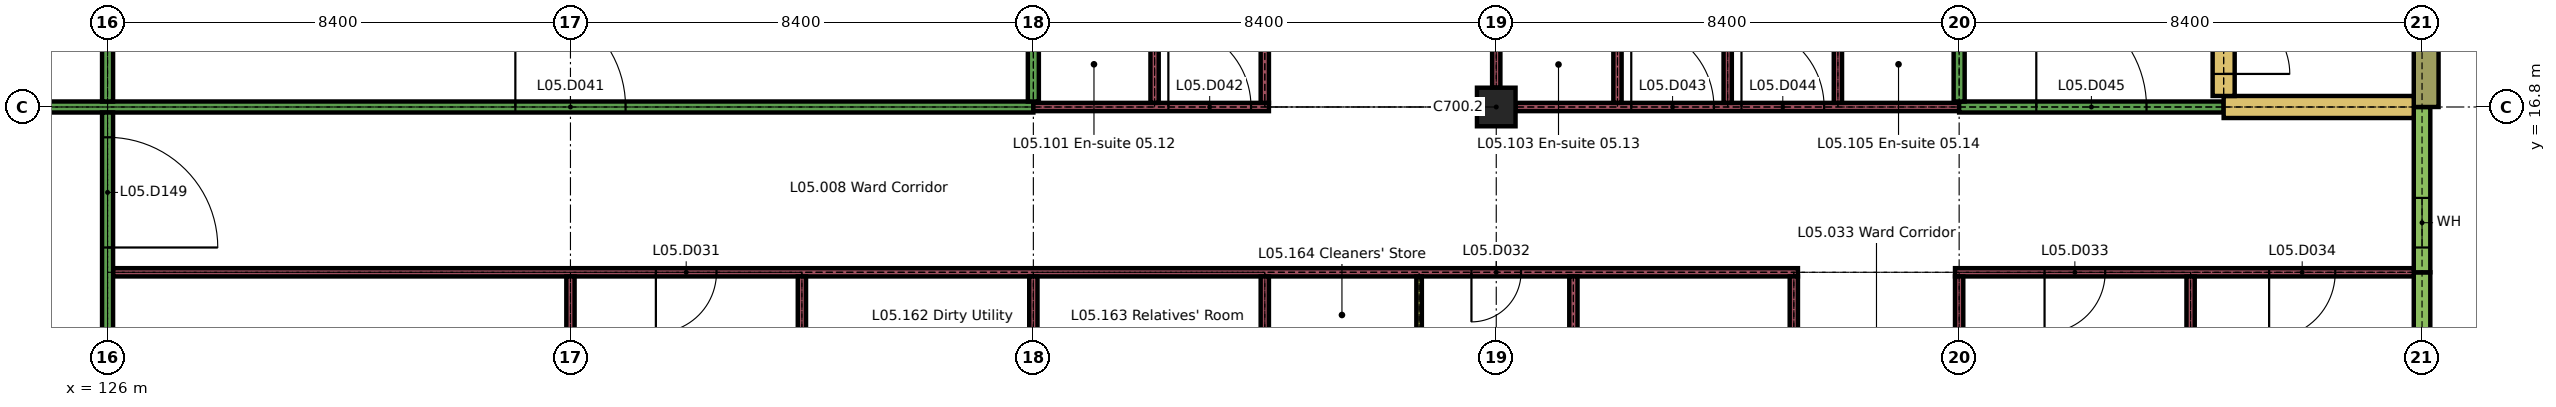
"""IFC4 building model, lengths in metres.
Left out: names, types, materials, properties, quantities, classifications, styles, units other than length and angle.
Written with IfcOpenShell. Run it as: python <this file> out.ifc"""

import sys

from ifc_helpers import new_model, si_unit, direction, frame, frame_2d, origin, origin_2d, place, context, subcontext, project, spatial, rectangle, extrude, element, fill, save


model = new_model("IFC4")
c1 = context("Model", 3, precision=1e-05, world=origin(), true_north=direction((0.0, 1.0)))
c2 = subcontext(c1, "Body", "Model", "MODEL_VIEW")
j1 = project(units=[si_unit("LENGTHUNIT", "METRE"), si_unit("PLANEANGLEUNIT", "RADIAN")], contexts=[c1])
p1 = place(None, origin())
s1 = spatial("IfcSite", under=j1, at=p1, CompositionType="ELEMENT")
p2 = place(p1, origin())
s2 = spatial("IfcBuilding", under=s1, at=p2, CompositionType="ELEMENT")
p3 = place(p2, frame((0.0, 0.0, 22.5)))
s3 = spatial("IfcBuildingStorey", under=s2, at=p3, CompositionType="ELEMENT", Elevation=22.5)
p4 = place(p3, frame((151.2, 16.8, 0.0), z_axis=(0.0, 0.0, 1.0), x_axis=(1.0, 0.0, 0.0)))
e1 = element("IfcColumn", 1, at=p4, inside=s3, PredefinedType="COLUMN", context=c2, shape_type="SweptSolid", body=[
    extrude(rectangle(XDim=0.7, YDim=0.7, at=origin_2d()), origin(), (0.0, 0.0, 1.0), 3.26),
])
p5 = place(p3, frame((168.0, 11.4, 0.0), z_axis=(0.0, 0.0, 1.0), x_axis=(0.0, 1.0, 0.0)))
e2 = element("IfcWall", 2, at=p5, inside=s3, PredefinedType="SOLIDWALL", context=c2, shape_type="SweptSolid", body=[
    extrude(rectangle(XDim=2.4, YDim=0.3, at=frame_2d((1.2, 0.0))), origin(), (0.0, 0.0, 1.0), 2.96),
])
p6 = place(p3, frame((168.0, 13.8, 0.0), z_axis=(0.0, 0.0, 1.0), x_axis=(0.0, 1.0, 0.0)))
e3 = element("IfcWall", 3, at=p6, inside=s3, PredefinedType="SOLIDWALL", context=c2, shape_type="SweptSolid", body=[
    extrude(rectangle(XDim=3.0, YDim=0.3, at=frame_2d((1.5, 0.0))), origin(), (0.0, 0.0, 1.0), 2.96),
])
p7 = place(p6, frame((0.45, 0.0, 0.9)))
e4 = element("IfcOpeningElement", 4, at=p7, cuts=e3, PredefinedType="OPENING", context=c2, shape_type="SweptSolid", body=[
    extrude(rectangle(XDim=0.9, YDim=1.5, at=frame_2d((0.45, 0.75))), frame((0.0, 0.16, 0.0), z_axis=(0.0, -1.0, 0.0), x_axis=(1.0, 0.0, 0.0)), (0.0, 0.0, 1.0), 0.32),
])
p8 = place(p3, frame((168.075, 16.8, 0.0), z_axis=(0.0, 0.0, 1.0), x_axis=(0.0, 1.0, 0.0)))
e5 = element("IfcWall", 5, at=p8, inside=s3, PredefinedType="SOLIDWALL", context=c2, shape_type="SweptSolid", body=[
    extrude(rectangle(XDim=3.15, YDim=0.45, at=frame_2d((1.575, 0.0))), origin(), (0.0, 0.0, 1.0), 3.26),
])
p9 = place(p3, frame((126.1, 13.8, 0.0), z_axis=(0.0, 0.0, 1.0), x_axis=(1.0, 0.0, 0.0)))
e6 = element("IfcWall", 6, at=p9, inside=s3, PredefinedType="PARTITIONING", context=c2, shape_type="SweptSolid", body=[
    extrude(rectangle(XDim=30.575, YDim=0.15, at=frame_2d((15.288, 0.0))), origin(), (0.0, 0.0, 1.0), 3.26),
])
p10 = place(p9, frame((9.85, 0.0, 0.0)))
e7 = element("IfcOpeningElement", 7, at=p10, cuts=e6, PredefinedType="OPENING", context=c2, shape_type="SweptSolid", body=[
    extrude(rectangle(XDim=1.1, YDim=2.1, at=frame_2d((0.55, 1.05))), frame((0.0, 0.085, 0.0), z_axis=(0.0, -1.0, 0.0), x_axis=(1.0, 0.0, 0.0)), (0.0, 0.0, 1.0), 0.17),
])
p11 = place(p9, frame((24.65, 0.0, 0.0)))
e8 = element("IfcOpeningElement", 8, at=p11, cuts=e6, PredefinedType="OPENING", context=c2, shape_type="SweptSolid", body=[
    extrude(rectangle(XDim=0.9, YDim=2.1, at=frame_2d((0.45, 1.05))), frame((0.0, 0.085, 0.0), z_axis=(0.0, -1.0, 0.0), x_axis=(1.0, 0.0, 0.0)), (0.0, 0.0, 1.0), 0.17),
])
p12 = place(p3, frame((159.525, 13.8, 0.0), z_axis=(0.0, 0.0, 1.0), x_axis=(1.0, 0.0, 0.0)))
e9 = element("IfcWall", 9, at=p12, inside=s3, PredefinedType="PARTITIONING", context=c2, shape_type="SweptSolid", body=[
    extrude(rectangle(XDim=8.325, YDim=0.15, at=frame_2d((4.163, 0.0))), origin(), (0.0, 0.0, 1.0), 3.26),
])
p13 = place(p12, frame((1.625, 0.0, 0.0)))
e10 = element("IfcOpeningElement", 10, at=p13, cuts=e9, PredefinedType="OPENING", context=c2, shape_type="SweptSolid", body=[
    extrude(rectangle(XDim=1.1, YDim=2.1, at=frame_2d((0.55, 1.05))), frame((0.0, 0.085, 0.0), z_axis=(0.0, -1.0, 0.0), x_axis=(1.0, 0.0, 0.0)), (0.0, 0.0, 1.0), 0.17),
])
p14 = place(p12, frame((5.7, 0.0, 0.0)))
e11 = element("IfcOpeningElement", 11, at=p14, cuts=e9, PredefinedType="OPENING", context=c2, shape_type="SweptSolid", body=[
    extrude(rectangle(XDim=1.2, YDim=2.1, at=frame_2d((0.6, 1.05))), frame((0.0, 0.085, 0.0), z_axis=(0.0, -1.0, 0.0), x_axis=(1.0, 0.0, 0.0)), (0.0, 0.0, 1.0), 0.17),
])
p15 = place(p3, frame((117.7, 16.8, 0.0), z_axis=(0.0, 0.0, 1.0), x_axis=(1.0, 0.0, 0.0)))
e12 = element("IfcWall", 12, at=p15, inside=s3, PredefinedType="PARTITIONING", context=c2, shape_type="SweptSolid", body=[
    extrude(rectangle(XDim=25.1, YDim=0.2, at=frame_2d((12.55, 0.0))), origin(), (0.0, 0.0, 1.0), 3.26),
])
p16 = place(p15, frame((3.3, 0.0, 0.0)))
e13 = element("IfcOpeningElement", 13, at=p16, cuts=e12, PredefinedType="OPENING", context=c2, shape_type="SweptSolid", body=[
    extrude(rectangle(XDim=1.7, YDim=2.4, at=frame_2d((0.85, 1.2))), frame((0.0, 0.11, 0.0), z_axis=(0.0, -1.0, 0.0), x_axis=(1.0, 0.0, 0.0)), (0.0, 0.0, 1.0), 0.22),
])
p17 = place(p15, frame((15.7, 0.0, 0.0)))
e14 = element("IfcOpeningElement", 14, at=p17, cuts=e12, PredefinedType="OPENING", context=c2, shape_type="SweptSolid", body=[
    extrude(rectangle(XDim=2.0, YDim=2.4, at=frame_2d((1.0, 1.2))), frame((0.0, 0.11, 0.0), z_axis=(0.0, -1.0, 0.0), x_axis=(1.0, 0.0, 0.0)), (0.0, 0.0, 1.0), 0.22),
])
p18 = place(p3, frame((142.8, 16.8, 0.0), z_axis=(0.0, 0.0, 1.0), x_axis=(1.0, 0.0, 0.0)))
e15 = element("IfcWall", 15, at=p18, inside=s3, PredefinedType="PARTITIONING", context=c2, shape_type="SweptSolid", body=[
    extrude(rectangle(XDim=4.275, YDim=0.15, at=frame_2d((2.137, 0.0))), origin(), (0.0, 0.0, 1.0), 3.26),
])
p19 = place(p18, frame((2.45, 0.0, 0.0)))
e16 = element("IfcOpeningElement", 16, at=p19, cuts=e15, PredefinedType="OPENING", context=c2, shape_type="SweptSolid", body=[
    extrude(rectangle(XDim=1.5, YDim=2.4, at=frame_2d((0.75, 1.2))), frame((0.0, 0.085, 0.0), z_axis=(0.0, -1.0, 0.0), x_axis=(1.0, 0.0, 0.0)), (0.0, 0.0, 1.0), 0.17),
])
p20 = place(p3, frame((151.55, 16.8, 0.0), z_axis=(0.0, 0.0, 1.0), x_axis=(1.0, 0.0, 0.0)))
e17 = element("IfcWall", 17, at=p20, inside=s3, PredefinedType="PARTITIONING", context=c2, shape_type="SweptSolid", body=[
    extrude(rectangle(XDim=8.05, YDim=0.15, at=frame_2d((4.025, 0.0))), origin(), (0.0, 0.0, 1.0), 3.26),
])
p21 = place(p20, frame((2.1, 0.0, 0.0)))
e18 = element("IfcOpeningElement", 18, at=p21, cuts=e17, PredefinedType="OPENING", context=c2, shape_type="SweptSolid", body=[
    extrude(rectangle(XDim=1.5, YDim=2.4, at=frame_2d((0.75, 1.2))), frame((0.0, 0.085, 0.0), z_axis=(0.0, -1.0, 0.0), x_axis=(1.0, 0.0, 0.0)), (0.0, 0.0, 1.0), 0.17),
])
p22 = place(p20, frame((4.1, 0.0, 0.0)))
e19 = element("IfcOpeningElement", 19, at=p22, cuts=e17, PredefinedType="OPENING", context=c2, shape_type="SweptSolid", body=[
    extrude(rectangle(XDim=1.5, YDim=2.4, at=frame_2d((0.75, 1.2))), frame((0.0, 0.085, 0.0), z_axis=(0.0, -1.0, 0.0), x_axis=(1.0, 0.0, 0.0)), (0.0, 0.0, 1.0), 0.17),
])
p23 = place(p3, frame((159.6, 16.8, 0.0), z_axis=(0.0, 0.0, 1.0), x_axis=(1.0, 0.0, 0.0)))
e20 = element("IfcWall", 20, at=p23, inside=s3, PredefinedType="PARTITIONING", context=c2, shape_type="SweptSolid", body=[
    extrude(rectangle(XDim=4.8, YDim=0.2, at=frame_2d((2.4, 0.0))), origin(), (0.0, 0.0, 1.0), 3.26),
])
p24 = place(p23, frame((1.4, 0.0, 0.0)))
e21 = element("IfcOpeningElement", 21, at=p24, cuts=e20, PredefinedType="OPENING", context=c2, shape_type="SweptSolid", body=[
    extrude(rectangle(XDim=2.0, YDim=2.4, at=frame_2d((1.0, 1.2))), frame((0.0, 0.11, 0.0), z_axis=(0.0, -1.0, 0.0), x_axis=(1.0, 0.0, 0.0)), (0.0, 0.0, 1.0), 0.22),
])
p25 = place(p3, frame((164.4, 16.8, 0.0), z_axis=(0.0, 0.0, 1.0), x_axis=(1.0, 0.0, 0.0)))
e22 = element("IfcWall", 22, at=p25, inside=s3, PredefinedType="SHEAR", context=c2, shape_type="SweptSolid", body=[
    extrude(rectangle(XDim=3.45, YDim=0.4, at=frame_2d((1.725, 0.0))), origin(), (0.0, 0.0, 1.0), 3.26),
])
p26 = place(p3, frame((126.0, 8.775, 0.0), z_axis=(0.0, 0.0, 1.0), x_axis=(0.0, 1.0, 0.0)))
e23 = element("IfcWall", 23, at=p26, inside=s3, PredefinedType="PARTITIONING", context=c2, shape_type="SweptSolid", body=[
    extrude(rectangle(XDim=7.925, YDim=0.2, at=frame_2d((3.962, 0.0))), origin(), (0.0, 0.0, 1.0), 3.26),
])
p27 = place(p26, frame((0.312, 0.0, 0.0)))
e24 = element("IfcOpeningElement", 24, at=p27, cuts=e23, PredefinedType="OPENING", context=c2, shape_type="SweptSolid", body=[
    extrude(rectangle(XDim=2.0, YDim=2.4, at=frame_2d((1.0, 1.2))), frame((0.0, 0.11, 0.0), z_axis=(0.0, -1.0, 0.0), x_axis=(1.0, 0.0, 0.0)), (0.0, 0.0, 1.0), 0.22),
])
p28 = place(p26, frame((5.475, 0.0, 0.0)))
e25 = element("IfcOpeningElement", 25, at=p28, cuts=e23, PredefinedType="OPENING", context=c2, shape_type="SweptSolid", body=[
    extrude(rectangle(XDim=2.0, YDim=2.4, at=frame_2d((1.0, 1.2))), frame((0.0, 0.11, 0.0), z_axis=(0.0, -1.0, 0.0), x_axis=(1.0, 0.0, 0.0)), (0.0, 0.0, 1.0), 0.22),
])
p29 = place(p3, frame((126.0, 16.9, 0.0), z_axis=(0.0, 0.0, 1.0), x_axis=(0.0, 1.0, 0.0)))
e26 = element("IfcWall", 26, at=p29, inside=s3, PredefinedType="PARTITIONING", context=c2, shape_type="SweptSolid", body=[
    extrude(rectangle(XDim=4.5, YDim=0.2, at=frame_2d((2.25, 0.0))), origin(), (0.0, 0.0, 1.0), 3.26),
])
for number, where, z_axis, x_axis in (
    (27, (134.4, 11.475, 0.0), (0.0, 0.0, 1.0), (0.0, 1.0, 0.0)),
    (28, (138.6, 11.475, 0.0), (0.0, 0.0, 1.0), (0.0, 1.0, 0.0)),
    (29, (142.8, 11.475, 0.0), (0.0, 0.0, 1.0), (0.0, 1.0, 0.0)),
):
    element("IfcWall", number, at=place(p3, frame(where, z_axis=z_axis, x_axis=x_axis)), inside=s3, PredefinedType="PARTITIONING", context=c2, shape_type="SweptSolid", body=[
        extrude(rectangle(XDim=2.25, YDim=0.15, at=frame_2d((1.125, 0.0))), origin(), (0.0, 0.0, 1.0), 3.26),
    ])
p30 = place(p3, frame((142.8, 16.9, 0.0), z_axis=(0.0, 0.0, 1.0), x_axis=(0.0, 1.0, 0.0)))
e30 = element("IfcWall", 30, at=p30, inside=s3, PredefinedType="PARTITIONING", context=c2, shape_type="SweptSolid", body=[
    extrude(rectangle(XDim=4.7, YDim=0.2, at=frame_2d((2.35, 0.0))), origin(), (0.0, 0.0, 1.0), 3.26),
])
for number, where, z_axis, x_axis in (
    (31, (145.0, 16.875, 0.0), (0.0, 0.0, 1.0), (0.0, 1.0, 0.0)),
    (32, (147.0, 11.475, 0.0), (0.0, 0.0, 1.0), (0.0, 1.0, 0.0)),
):
    element("IfcWall", number, at=place(p3, frame(where, z_axis=z_axis, x_axis=x_axis)), inside=s3, PredefinedType="PARTITIONING", context=c2, shape_type="SweptSolid", body=[
        extrude(rectangle(XDim=2.25, YDim=0.15, at=frame_2d((1.125, 0.0))), origin(), (0.0, 0.0, 1.0), 3.26),
    ])
p31 = place(p3, frame((147.0, 16.875, 0.0), z_axis=(0.0, 0.0, 1.0), x_axis=(0.0, 1.0, 0.0)))
e33 = element("IfcWall", 33, at=p31, inside=s3, PredefinedType="PARTITIONING", context=c2, shape_type="SweptSolid", body=[
    extrude(rectangle(XDim=8.175, YDim=0.15, at=frame_2d((4.087, 0.0))), origin(), (0.0, 0.0, 1.0), 3.26),
])
p32 = place(p3, frame((149.8, 11.475, 0.0), z_axis=(0.0, 0.0, 1.0), x_axis=(0.0, 1.0, 0.0)))
e34 = element("IfcWall", 34, at=p32, inside=s3, PredefinedType="PARTITIONING", context=c2, shape_type="SweptSolid", body=[
    extrude(rectangle(XDim=2.25, YDim=0.1, at=frame_2d((1.125, 0.0))), origin(), (0.0, 0.0, 1.0), 3.26),
])
p33 = place(p3, frame((151.2, 17.15, 0.0), z_axis=(0.0, 0.0, 1.0), x_axis=(0.0, 1.0, 0.0)))
e35 = element("IfcWall", 35, at=p33, inside=s3, PredefinedType="PARTITIONING", context=c2, shape_type="SweptSolid", body=[
    extrude(rectangle(XDim=7.7, YDim=0.15, at=frame_2d((3.85, 0.0))), origin(), (0.0, 0.0, 1.0), 3.26),
])
for number, where, z_axis, x_axis in (
    (36, (152.6, 11.475, 0.0), (0.0, 0.0, 1.0), (0.0, 1.0, 0.0)),
    (37, (153.4, 16.875, 0.0), (0.0, 0.0, 1.0), (0.0, 1.0, 0.0)),
):
    element("IfcWall", number, at=place(p3, frame(where, z_axis=z_axis, x_axis=x_axis)), inside=s3, PredefinedType="PARTITIONING", context=c2, shape_type="SweptSolid", body=[
        extrude(rectangle(XDim=2.25, YDim=0.15, at=frame_2d((1.125, 0.0))), origin(), (0.0, 0.0, 1.0), 3.26),
    ])
p34 = place(p3, frame((155.4, 16.875, 0.0), z_axis=(0.0, 0.0, 1.0), x_axis=(0.0, 1.0, 0.0)))
e38 = element("IfcWall", 38, at=p34, inside=s3, PredefinedType="PARTITIONING", context=c2, shape_type="SweptSolid", body=[
    extrude(rectangle(XDim=8.175, YDim=0.15, at=frame_2d((4.087, 0.0))), origin(), (0.0, 0.0, 1.0), 3.26),
])
p35 = place(p3, frame((156.6, 11.4, 0.0), z_axis=(0.0, 0.0, 1.0), x_axis=(0.0, 1.0, 0.0)))
e39 = element("IfcWall", 39, at=p35, inside=s3, PredefinedType="PARTITIONING", context=c2, shape_type="SweptSolid", body=[
    extrude(rectangle(XDim=2.325, YDim=0.15, at=frame_2d((1.163, 0.0))), origin(), (0.0, 0.0, 1.0), 3.26),
])
for number, where, z_axis, x_axis in (
    (40, (157.4, 16.875, 0.0), (0.0, 0.0, 1.0), (0.0, 1.0, 0.0)),
    (41, (159.6, 11.475, 0.0), (0.0, 0.0, 1.0), (0.0, 1.0, 0.0)),
):
    element("IfcWall", number, at=place(p3, frame(where, z_axis=z_axis, x_axis=x_axis)), inside=s3, PredefinedType="PARTITIONING", context=c2, shape_type="SweptSolid", body=[
        extrude(rectangle(XDim=2.25, YDim=0.15, at=frame_2d((1.125, 0.0))), origin(), (0.0, 0.0, 1.0), 3.26),
    ])
p36 = place(p3, frame((159.6, 16.9, 0.0), z_axis=(0.0, 0.0, 1.0), x_axis=(0.0, 1.0, 0.0)))
e42 = element("IfcWall", 42, at=p36, inside=s3, PredefinedType="PARTITIONING", context=c2, shape_type="SweptSolid", body=[
    extrude(rectangle(XDim=8.15, YDim=0.2, at=frame_2d((4.075, 0.0))), origin(), (0.0, 0.0, 1.0), 3.26),
])
p37 = place(p3, frame((163.8, 11.475, 0.0), z_axis=(0.0, 0.0, 1.0), x_axis=(0.0, 1.0, 0.0)))
e43 = element("IfcWall", 43, at=p37, inside=s3, PredefinedType="PARTITIONING", context=c2, shape_type="SweptSolid", body=[
    extrude(rectangle(XDim=2.25, YDim=0.15, at=frame_2d((1.125, 0.0))), origin(), (0.0, 0.0, 1.0), 3.26),
])
p38 = place(p3, frame((164.4, 17.0, 0.0), z_axis=(0.0, 0.0, 1.0), x_axis=(0.0, 1.0, 0.0)))
e44 = element("IfcWall", 44, at=p38, inside=s3, PredefinedType="SHEAR", context=c2, shape_type="SweptSolid", body=[
    extrude(rectangle(XDim=8.05, YDim=0.4, at=frame_2d((4.025, 0.0))), origin(), (0.0, 0.0, 1.0), 3.26),
])
p39 = place(p38, frame((0.4, 0.0, 0.0)))
e45 = element("IfcOpeningElement", 45, at=p39, cuts=e44, PredefinedType="OPENING", context=c2, shape_type="SweptSolid", body=[
    extrude(rectangle(XDim=1.2, YDim=2.1, at=frame_2d((0.6, 1.05))), frame((0.0, 0.21, 0.0), z_axis=(0.0, -1.0, 0.0), x_axis=(1.0, 0.0, 0.0)), (0.0, 0.0, 1.0), 0.42),
])
p40 = place(p7, origin())
e46 = element("IfcWindow", 46, at=p40, inside=s3, PartitioningType="SINGLE_PANEL", PredefinedType="WINDOW", context=c2, shape_type="SweptSolid", body=[
    extrude(rectangle(XDim=0.9, YDim=1.5, at=frame_2d((0.45, 0.75))), frame((0.0, 0.03, 0.0), z_axis=(0.0, -1.0, 0.0), x_axis=(1.0, 0.0, 0.0)), (0.0, 0.0, 1.0), 0.06),
])
fill(e4, e46)
p41 = place(p10, origin())
e47 = element("IfcDoor", 47, at=p41, inside=s3, OperationType="SINGLE_SWING_LEFT", PredefinedType="DOOR", context=c2, shape_type="SweptSolid", body=[
    extrude(rectangle(XDim=1.1, YDim=2.1, at=frame_2d((0.55, 1.05))), frame((0.0, 0.025, 0.0), z_axis=(0.0, -1.0, 0.0), x_axis=(1.0, 0.0, 0.0)), (0.0, 0.0, 1.0), 0.05),
])
fill(e7, e47)
p42 = place(p11, origin())
e48 = element("IfcDoor", 48, at=p42, inside=s3, OperationType="SINGLE_SWING_LEFT", PredefinedType="DOOR", context=c2, shape_type="SweptSolid", body=[
    extrude(rectangle(XDim=0.9, YDim=2.1, at=frame_2d((0.45, 1.05))), frame((0.0, 0.02, 0.0), z_axis=(0.0, -1.0, 0.0), x_axis=(1.0, 0.0, 0.0)), (0.0, 0.0, 1.0), 0.04),
])
fill(e8, e48)
p43 = place(p13, origin())
e49 = element("IfcDoor", 49, at=p43, inside=s3, OperationType="SINGLE_SWING_LEFT", PredefinedType="DOOR", context=c2, shape_type="SweptSolid", body=[
    extrude(rectangle(XDim=1.1, YDim=2.1, at=frame_2d((0.55, 1.05))), frame((0.0, 0.025, 0.0), z_axis=(0.0, -1.0, 0.0), x_axis=(1.0, 0.0, 0.0)), (0.0, 0.0, 1.0), 0.05),
])
fill(e10, e49)
p44 = place(p14, origin())
e50 = element("IfcDoor", 50, at=p44, inside=s3, OperationType="SINGLE_SWING_LEFT", PredefinedType="DOOR", context=c2, shape_type="SweptSolid", body=[
    extrude(rectangle(XDim=1.2, YDim=2.1, at=frame_2d((0.6, 1.05))), frame((0.0, 0.025, 0.0), z_axis=(0.0, -1.0, 0.0), x_axis=(1.0, 0.0, 0.0)), (0.0, 0.0, 1.0), 0.05),
])
fill(e11, e50)
p45 = place(p17, origin())
e51 = element("IfcDoor", 51, at=p45, inside=s3, OperationType="SINGLE_SWING_RIGHT", PredefinedType="DOOR", context=c2, shape_type="SweptSolid", body=[
    extrude(rectangle(XDim=2.0, YDim=2.4, at=frame_2d((1.0, 1.2))), frame((0.0, 0.03, 0.0), z_axis=(0.0, -1.0, 0.0), x_axis=(1.0, 0.0, 0.0)), (0.0, 0.0, 1.0), 0.06),
])
fill(e14, e51)
p46 = place(p19, origin())
e52 = element("IfcDoor", 52, at=p46, inside=s3, OperationType="SINGLE_SWING_RIGHT", PredefinedType="DOOR", context=c2, shape_type="SweptSolid", body=[
    extrude(rectangle(XDim=1.5, YDim=2.4, at=frame_2d((0.75, 1.2))), frame((0.0, 0.03, 0.0), z_axis=(0.0, -1.0, 0.0), x_axis=(1.0, 0.0, 0.0)), (0.0, 0.0, 1.0), 0.06),
])
fill(e16, e52)
p47 = place(p21, origin())
e53 = element("IfcDoor", 53, at=p47, inside=s3, OperationType="SINGLE_SWING_RIGHT", PredefinedType="DOOR", context=c2, shape_type="SweptSolid", body=[
    extrude(rectangle(XDim=1.5, YDim=2.4, at=frame_2d((0.75, 1.2))), frame((0.0, 0.03, 0.0), z_axis=(0.0, -1.0, 0.0), x_axis=(1.0, 0.0, 0.0)), (0.0, 0.0, 1.0), 0.06),
])
fill(e18, e53)
p48 = place(p22, origin())
e54 = element("IfcDoor", 54, at=p48, inside=s3, OperationType="SINGLE_SWING_RIGHT", PredefinedType="DOOR", context=c2, shape_type="SweptSolid", body=[
    extrude(rectangle(XDim=1.5, YDim=2.4, at=frame_2d((0.75, 1.2))), frame((0.0, 0.03, 0.0), z_axis=(0.0, -1.0, 0.0), x_axis=(1.0, 0.0, 0.0)), (0.0, 0.0, 1.0), 0.06),
])
fill(e19, e54)
p49 = place(p24, origin())
e55 = element("IfcDoor", 55, at=p49, inside=s3, OperationType="SINGLE_SWING_RIGHT", PredefinedType="DOOR", context=c2, shape_type="SweptSolid", body=[
    extrude(rectangle(XDim=2.0, YDim=2.4, at=frame_2d((1.0, 1.2))), frame((0.0, 0.03, 0.0), z_axis=(0.0, -1.0, 0.0), x_axis=(1.0, 0.0, 0.0)), (0.0, 0.0, 1.0), 0.06),
])
fill(e21, e55)
p50 = place(p28, origin())
e56 = element("IfcDoor", 56, at=p50, inside=s3, OperationType="SINGLE_SWING_LEFT", PredefinedType="DOOR", context=c2, shape_type="SweptSolid", body=[
    extrude(rectangle(XDim=2.0, YDim=2.4, at=frame_2d((1.0, 1.2))), frame((0.0, 0.03, 0.0), z_axis=(0.0, -1.0, 0.0), x_axis=(1.0, 0.0, 0.0)), (0.0, 0.0, 1.0), 0.06),
])
fill(e25, e56)
p51 = place(p39, origin())
e57 = element("IfcDoor", 57, at=p51, inside=s3, OperationType="SINGLE_SWING_LEFT", PredefinedType="DOOR", context=c2, shape_type="SweptSolid", body=[
    extrude(rectangle(XDim=1.2, YDim=2.1, at=frame_2d((0.6, 1.05))), frame((0.0, 0.025, 0.0), z_axis=(0.0, -1.0, 0.0), x_axis=(1.0, 0.0, 0.0)), (0.0, 0.0, 1.0), 0.05),
])
fill(e45, e57)
save(model, sys.argv[1])
